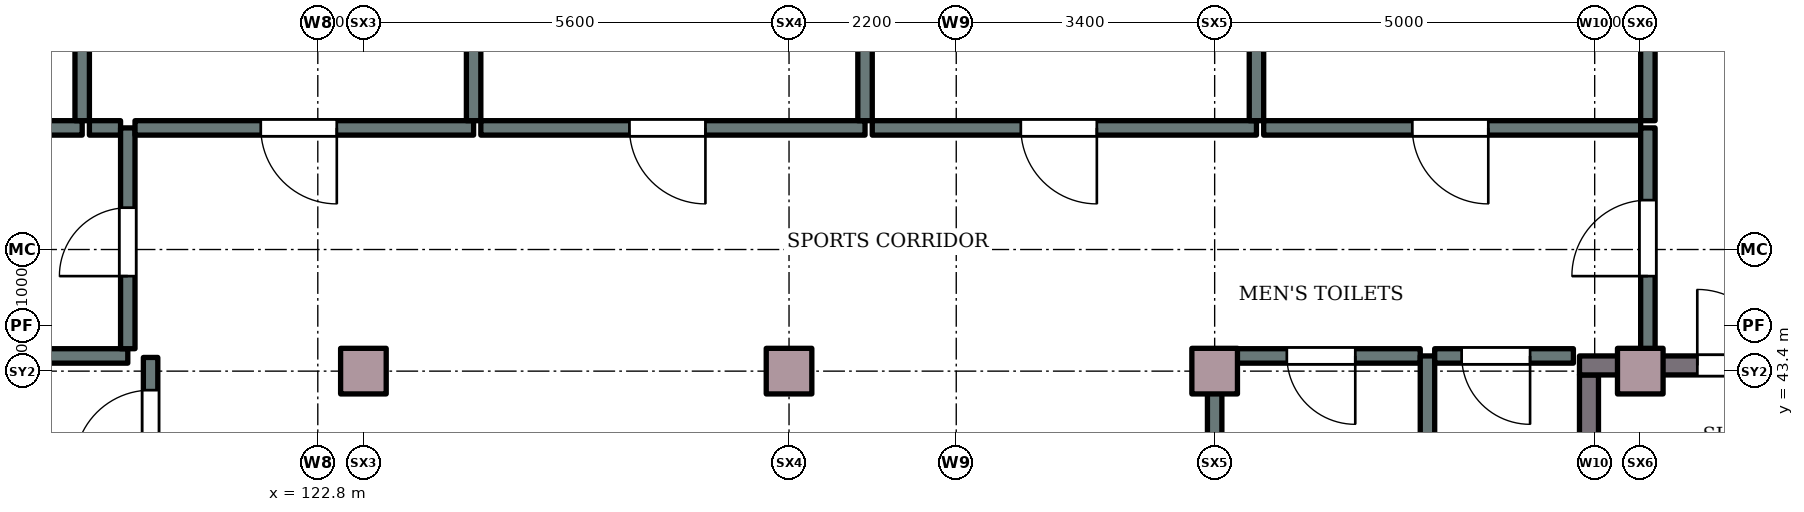
"""IFC4 building model, lengths in metres.
Left out: names, types, materials, properties, quantities, classifications, styles, units other than length and angle.
Written with IfcOpenShell. Run it as: python <this file> out.ifc"""

import sys

from ifc_helpers import new_model, si_unit, direction, frame, frame_2d, origin, origin_2d, place, context, subcontext, project, spatial, rectangle, extrude, element, fill, save


model = new_model("IFC4")
c1 = context("Model", 3, precision=1e-05, world=origin(), true_north=direction((0.0, 1.0)))
c2 = subcontext(c1, "Body", "Model", "MODEL_VIEW")
j1 = project(units=[si_unit("LENGTHUNIT", "METRE"), si_unit("PLANEANGLEUNIT", "RADIAN")], contexts=[c1])
p1 = place(None, origin())
s1 = spatial("IfcSite", under=j1, at=p1, CompositionType="ELEMENT")
p2 = place(p1, origin())
s2 = spatial("IfcBuilding", under=s1, at=p2, CompositionType="ELEMENT")
p3 = place(p2, origin())
s3 = spatial("IfcBuildingStorey", under=s2, at=p3, CompositionType="ELEMENT", Elevation=0.0)
for number, where, z_axis, x_axis in (
    (1, (123.4, 43.4, 0.0), (0.0, 0.0, 1.0), (1.0, 0.0, 0.0)),
    (2, (129.0, 43.4, 0.0), (0.0, 0.0, 1.0), (1.0, 0.0, 0.0)),
    (3, (134.6, 43.4, 0.0), (0.0, 0.0, 1.0), (1.0, 0.0, 0.0)),
    (4, (140.2, 43.4, 0.0), (0.0, 0.0, 1.0), (1.0, 0.0, 0.0)),
):
    element("IfcColumn", number, at=place(p3, frame(where, z_axis=z_axis, x_axis=x_axis)), inside=s3, PredefinedType="COLUMN", context=c2, shape_type="SweptSolid", body=[
        extrude(rectangle(XDim=0.6, YDim=0.6, at=origin_2d()), origin(), (0.0, 0.0, 1.0), 4.2),
    ])
p4 = place(p3, frame((139.525, 38.4, 0.0), z_axis=(0.0, 0.0, 1.0), x_axis=(0.0, 1.0, 0.0)))
e5 = element("IfcWall", 5, at=p4, inside=s3, PredefinedType="SHEAR", context=c2, shape_type="SweptSolid", body=[
    extrude(rectangle(XDim=4.95, YDim=0.25, at=frame_2d((2.475, 0.0))), origin(), (0.0, 0.0, 1.0), 4.2),
])
p5 = place(p3, frame((139.4, 43.475, 0.0), z_axis=(0.0, 0.0, 1.0), x_axis=(1.0, 0.0, 0.0)))
e6 = element("IfcWall", 6, at=p5, inside=s3, PredefinedType="SHEAR", context=c2, shape_type="SweptSolid", body=[
    extrude(rectangle(XDim=6.2, YDim=0.25, at=frame_2d((3.1, 0.0))), origin(), (0.0, 0.0, 1.0), 4.2),
])
p6 = place(p5, frame((1.55, 0.0, 0.0)))
e7 = element("IfcOpeningElement", 7, at=p6, cuts=e6, PredefinedType="OPENING", context=c2, shape_type="SweptSolid", body=[
    extrude(rectangle(XDim=1.0, YDim=2.1, at=frame_2d((0.5, 1.05))), frame((0.0, 0.135, 0.0), z_axis=(0.0, -1.0, 0.0), x_axis=(1.0, 0.0, 0.0)), (0.0, 0.0, 1.0), 0.27),
])
p7 = place(p3, frame((119.7, 46.6, 0.0), z_axis=(0.0, 0.0, 1.0), x_axis=(-1.0, 0.0, 0.0)))
e8 = element("IfcWall", 8, at=p7, inside=s3, PredefinedType="PARTITIONING", context=c2, shape_type="SweptSolid", body=[
    extrude(rectangle(XDim=1.905, YDim=0.19, at=frame_2d((0.953, 0.0))), origin(), (0.0, 0.0, 1.0), 3.9),
])
p8 = place(p7, frame((0.55, 0.0, 0.0)))
e9 = element("IfcOpeningElement", 9, at=p8, cuts=e8, PredefinedType="OPENING", context=c2, shape_type="SweptSolid", body=[
    extrude(rectangle(XDim=0.9, YDim=2.1, at=frame_2d((0.45, 1.05))), frame((0.0, 0.105, 0.0), z_axis=(0.0, -1.0, 0.0), x_axis=(1.0, 0.0, 0.0)), (0.0, 0.0, 1.0), 0.21),
])
p9 = place(p3, frame((119.7, 46.695, 0.0), z_axis=(0.0, 0.0, 1.0), x_axis=(0.0, 1.0, 0.0)))
e10 = element("IfcWall", 10, at=p9, inside=s3, PredefinedType="PARTITIONING", context=c2, shape_type="SweptSolid", body=[
    extrude(rectangle(XDim=6.305, YDim=0.19, at=frame_2d((3.152, 0.0))), origin(), (0.0, 0.0, 1.0), 3.9),
])
p10 = place(p9, frame((2.655, 0.0, 0.0)))
e11 = element("IfcOpeningElement", 11, at=p10, cuts=e10, PredefinedType="OPENING", context=c2, shape_type="SweptSolid", body=[
    extrude(rectangle(XDim=1.0, YDim=2.1, at=frame_2d((0.5, 1.05))), frame((0.0, 0.105, 0.0), z_axis=(0.0, -1.0, 0.0), x_axis=(1.0, 0.0, 0.0)), (0.0, 0.0, 1.0), 0.21),
])
p11 = place(p3, frame((120.205, 46.6, 0.0), z_axis=(0.0, 0.0, 1.0), x_axis=(-1.0, 0.0, 0.0)))
e12 = element("IfcWall", 12, at=p11, inside=s3, PredefinedType="PARTITIONING", context=c2, shape_type="SweptSolid", body=[
    extrude(rectangle(XDim=0.41, YDim=0.19, at=frame_2d((0.205, 0.0))), origin(), (0.0, 0.0, 1.0), 3.9),
])
p12 = place(p3, frame((120.3, 43.6, 0.0), z_axis=(0.0, 0.0, 1.0), x_axis=(-1.0, 0.0, 0.0)))
e13 = element("IfcWall", 13, at=p12, inside=s3, PredefinedType="PARTITIONING", context=c2, shape_type="SweptSolid", body=[
    extrude(rectangle(XDim=1.62, YDim=0.19, at=frame_2d((0.81, 0.0))), origin(), (0.0, 0.0, 1.0), 3.9),
])
p13 = place(p3, frame((120.3, 43.695, 0.0), z_axis=(0.0, 0.0, 1.0), x_axis=(0.0, 1.0, 0.0)))
e14 = element("IfcWall", 14, at=p13, inside=s3, PredefinedType="PARTITIONING", context=c2, shape_type="SweptSolid", body=[
    extrude(rectangle(XDim=2.905, YDim=0.19, at=frame_2d((1.453, 0.0))), origin(), (0.0, 0.0, 1.0), 3.9),
])
p14 = place(p13, frame((0.955, 0.0, 0.0)))
e15 = element("IfcOpeningElement", 15, at=p14, cuts=e14, PredefinedType="OPENING", context=c2, shape_type="SweptSolid", body=[
    extrude(rectangle(XDim=0.9, YDim=2.1, at=frame_2d((0.45, 1.05))), frame((0.0, 0.105, 0.0), z_axis=(0.0, -1.0, 0.0), x_axis=(1.0, 0.0, 0.0)), (0.0, 0.0, 1.0), 0.21),
])
p15 = place(p3, frame((120.6, 41.68, 0.0), z_axis=(0.0, 0.0, 1.0), x_axis=(0.0, 1.0, 0.0)))
e16 = element("IfcWall", 16, at=p15, inside=s3, PredefinedType="PARTITIONING", context=c2, shape_type="SweptSolid", body=[
    extrude(rectangle(XDim=1.9, YDim=0.19, at=frame_2d((0.95, 0.0))), origin(), (0.0, 0.0, 1.0), 3.9),
])
p16 = place(p15, frame((0.47, 0.0, 0.0)))
e17 = element("IfcOpeningElement", 17, at=p16, cuts=e16, PredefinedType="OPENING", context=c2, shape_type="SweptSolid", body=[
    extrude(rectangle(XDim=1.0, YDim=2.1, at=frame_2d((0.5, 1.05))), frame((0.0, 0.105, 0.0), z_axis=(0.0, -1.0, 0.0), x_axis=(1.0, 0.0, 0.0)), (0.0, 0.0, 1.0), 0.21),
])
p17 = place(p3, frame((124.85, 46.6, 0.0), z_axis=(0.0, 0.0, 1.0), x_axis=(-1.0, 0.0, 0.0)))
e18 = element("IfcWall", 18, at=p17, inside=s3, PredefinedType="PARTITIONING", context=c2, shape_type="SweptSolid", body=[
    extrude(rectangle(XDim=4.455, YDim=0.19, at=frame_2d((2.228, 0.0))), origin(), (0.0, 0.0, 1.0), 3.9),
])
p18 = place(p17, frame((1.8, 0.0, 0.0)))
e19 = element("IfcOpeningElement", 19, at=p18, cuts=e18, PredefinedType="OPENING", context=c2, shape_type="SweptSolid", body=[
    extrude(rectangle(XDim=1.0, YDim=2.1, at=frame_2d((0.5, 1.05))), frame((0.0, 0.105, 0.0), z_axis=(0.0, -1.0, 0.0), x_axis=(1.0, 0.0, 0.0)), (0.0, 0.0, 1.0), 0.21),
])
p19 = place(p3, frame((124.85, 46.695, 0.0), z_axis=(0.0, 0.0, 1.0), x_axis=(0.0, 1.0, 0.0)))
e20 = element("IfcWall", 20, at=p19, inside=s3, PredefinedType="PARTITIONING", context=c2, shape_type="SweptSolid", body=[
    extrude(rectangle(XDim=6.305, YDim=0.19, at=frame_2d((3.152, 0.0))), origin(), (0.0, 0.0, 1.0), 3.9),
])
p20 = place(p3, frame((130.0, 46.6, 0.0), z_axis=(0.0, 0.0, 1.0), x_axis=(-1.0, 0.0, 0.0)))
e21 = element("IfcWall", 21, at=p20, inside=s3, PredefinedType="PARTITIONING", context=c2, shape_type="SweptSolid", body=[
    extrude(rectangle(XDim=5.055, YDim=0.19, at=frame_2d((2.527, 0.0))), origin(), (0.0, 0.0, 1.0), 3.9),
])
p21 = place(p20, frame((2.1, 0.0, 0.0)))
e22 = element("IfcOpeningElement", 22, at=p21, cuts=e21, PredefinedType="OPENING", context=c2, shape_type="SweptSolid", body=[
    extrude(rectangle(XDim=1.0, YDim=2.1, at=frame_2d((0.5, 1.05))), frame((0.0, 0.105, 0.0), z_axis=(0.0, -1.0, 0.0), x_axis=(1.0, 0.0, 0.0)), (0.0, 0.0, 1.0), 0.21),
])
p22 = place(p3, frame((130.0, 46.695, 0.0), z_axis=(0.0, 0.0, 1.0), x_axis=(0.0, 1.0, 0.0)))
e23 = element("IfcWall", 23, at=p22, inside=s3, PredefinedType="PARTITIONING", context=c2, shape_type="SweptSolid", body=[
    extrude(rectangle(XDim=6.305, YDim=0.19, at=frame_2d((3.152, 0.0))), origin(), (0.0, 0.0, 1.0), 3.9),
])
p23 = place(p3, frame((134.6, 38.495, 0.0), z_axis=(0.0, 0.0, 1.0), x_axis=(0.0, 1.0, 0.0)))
e24 = element("IfcWall", 24, at=p23, inside=s3, PredefinedType="PARTITIONING", context=c2, shape_type="SweptSolid", body=[
    extrude(rectangle(XDim=5.085, YDim=0.19, at=frame_2d((2.542, 0.0))), origin(), (0.0, 0.0, 1.0), 3.9),
])
p24 = place(p23, frame((2.055, 0.0, 0.0)))
e25 = element("IfcOpeningElement", 25, at=p24, cuts=e24, PredefinedType="OPENING", context=c2, shape_type="SweptSolid", body=[
    extrude(rectangle(XDim=0.9, YDim=2.1, at=frame_2d((0.45, 1.05))), frame((0.0, 0.105, 0.0), z_axis=(0.0, -1.0, 0.0), x_axis=(1.0, 0.0, 0.0)), (0.0, 0.0, 1.0), 0.21),
])
p25 = place(p3, frame((135.15, 46.6, 0.0), z_axis=(0.0, 0.0, 1.0), x_axis=(-1.0, 0.0, 0.0)))
e26 = element("IfcWall", 26, at=p25, inside=s3, PredefinedType="PARTITIONING", context=c2, shape_type="SweptSolid", body=[
    extrude(rectangle(XDim=5.055, YDim=0.19, at=frame_2d((2.527, 0.0))), origin(), (0.0, 0.0, 1.0), 3.9),
])
p26 = place(p25, frame((2.1, 0.0, 0.0)))
e27 = element("IfcOpeningElement", 27, at=p26, cuts=e26, PredefinedType="OPENING", context=c2, shape_type="SweptSolid", body=[
    extrude(rectangle(XDim=1.0, YDim=2.1, at=frame_2d((0.5, 1.05))), frame((0.0, 0.105, 0.0), z_axis=(0.0, -1.0, 0.0), x_axis=(1.0, 0.0, 0.0)), (0.0, 0.0, 1.0), 0.21),
])
p27 = place(p3, frame((135.15, 46.695, 0.0), z_axis=(0.0, 0.0, 1.0), x_axis=(0.0, 1.0, 0.0)))
e28 = element("IfcWall", 28, at=p27, inside=s3, PredefinedType="PARTITIONING", context=c2, shape_type="SweptSolid", body=[
    extrude(rectangle(XDim=6.305, YDim=0.19, at=frame_2d((3.152, 0.0))), origin(), (0.0, 0.0, 1.0), 3.9),
])
p28 = place(p3, frame((137.305, 43.6, 0.0), z_axis=(0.0, 0.0, 1.0), x_axis=(-1.0, 0.0, 0.0)))
e29 = element("IfcWall", 29, at=p28, inside=s3, PredefinedType="PARTITIONING", context=c2, shape_type="SweptSolid", body=[
    extrude(rectangle(XDim=2.685, YDim=0.19, at=frame_2d((1.342, 0.0))), origin(), (0.0, 0.0, 1.0), 3.9),
])
p29 = place(p28, frame((0.855, 0.0, 0.0)))
e30 = element("IfcOpeningElement", 30, at=p29, cuts=e29, PredefinedType="OPENING", context=c2, shape_type="SweptSolid", body=[
    extrude(rectangle(XDim=0.9, YDim=2.1, at=frame_2d((0.45, 1.05))), frame((0.0, 0.105, 0.0), z_axis=(0.0, -1.0, 0.0), x_axis=(1.0, 0.0, 0.0)), (0.0, 0.0, 1.0), 0.21),
])
p30 = place(p3, frame((137.4, 38.48, 0.0), z_axis=(0.0, 0.0, 1.0), x_axis=(0.0, 1.0, 0.0)))
e31 = element("IfcWall", 31, at=p30, inside=s3, PredefinedType="PARTITIONING", context=c2, shape_type="SweptSolid", body=[
    extrude(rectangle(XDim=5.12, YDim=0.19, at=frame_2d((2.56, 0.0))), origin(), (0.0, 0.0, 1.0), 3.9),
])
p31 = place(p3, frame((139.32, 43.6, 0.0), z_axis=(0.0, 0.0, 1.0), x_axis=(-1.0, 0.0, 0.0)))
e32 = element("IfcWall", 32, at=p31, inside=s3, PredefinedType="PARTITIONING", context=c2, shape_type="SweptSolid", body=[
    extrude(rectangle(XDim=1.825, YDim=0.19, at=frame_2d((0.913, 0.0))), origin(), (0.0, 0.0, 1.0), 3.9),
])
p32 = place(p31, frame((0.57, 0.0, 0.0)))
e33 = element("IfcOpeningElement", 33, at=p32, cuts=e32, PredefinedType="OPENING", context=c2, shape_type="SweptSolid", body=[
    extrude(rectangle(XDim=0.9, YDim=2.1, at=frame_2d((0.45, 1.05))), frame((0.0, 0.105, 0.0), z_axis=(0.0, -1.0, 0.0), x_axis=(1.0, 0.0, 0.0)), (0.0, 0.0, 1.0), 0.21),
])
p33 = place(p3, frame((140.205, 46.6, 0.0), z_axis=(0.0, 0.0, 1.0), x_axis=(-1.0, 0.0, 0.0)))
e34 = element("IfcWall", 34, at=p33, inside=s3, PredefinedType="PARTITIONING", context=c2, shape_type="SweptSolid", body=[
    extrude(rectangle(XDim=4.96, YDim=0.19, at=frame_2d((2.48, 0.0))), origin(), (0.0, 0.0, 1.0), 3.9),
])
p34 = place(p33, frame((2.005, 0.0, 0.0)))
e35 = element("IfcOpeningElement", 35, at=p34, cuts=e34, PredefinedType="OPENING", context=c2, shape_type="SweptSolid", body=[
    extrude(rectangle(XDim=1.0, YDim=2.1, at=frame_2d((0.5, 1.05))), frame((0.0, 0.105, 0.0), z_axis=(0.0, -1.0, 0.0), x_axis=(1.0, 0.0, 0.0)), (0.0, 0.0, 1.0), 0.21),
])
p35 = place(p3, frame((140.3, 43.68, 0.0), z_axis=(0.0, 0.0, 1.0), x_axis=(0.0, 1.0, 0.0)))
e36 = element("IfcWall", 36, at=p35, inside=s3, PredefinedType="PARTITIONING", context=c2, shape_type="SweptSolid", body=[
    extrude(rectangle(XDim=2.92, YDim=0.19, at=frame_2d((1.46, 0.0))), origin(), (0.0, 0.0, 1.0), 3.9),
])
p36 = place(p35, frame((0.97, 0.0, 0.0)))
e37 = element("IfcOpeningElement", 37, at=p36, cuts=e36, PredefinedType="OPENING", context=c2, shape_type="SweptSolid", body=[
    extrude(rectangle(XDim=1.0, YDim=2.1, at=frame_2d((0.5, 1.05))), frame((0.0, 0.105, 0.0), z_axis=(0.0, -1.0, 0.0), x_axis=(1.0, 0.0, 0.0)), (0.0, 0.0, 1.0), 0.21),
])
p37 = place(p3, frame((140.3, 46.695, 0.0), z_axis=(0.0, 0.0, 1.0), x_axis=(0.0, 1.0, 0.0)))
e38 = element("IfcWall", 38, at=p37, inside=s3, PredefinedType="PARTITIONING", context=c2, shape_type="SweptSolid", body=[
    extrude(rectangle(XDim=6.305, YDim=0.19, at=frame_2d((3.152, 0.0))), origin(), (0.0, 0.0, 1.0), 3.9),
])
p38 = place(p16, origin())
e39 = element("IfcDoor", 39, at=p38, inside=s3, OperationType="SINGLE_SWING_LEFT", PredefinedType="DOOR", context=c2, shape_type="SweptSolid", body=[
    extrude(rectangle(XDim=1.0, YDim=2.1, at=frame_2d((0.5, 1.05))), frame((0.0, 0.025, 0.0), z_axis=(0.0, -1.0, 0.0), x_axis=(1.0, 0.0, 0.0)), (0.0, 0.0, 1.0), 0.05),
])
fill(e17, e39)
p39 = place(p29, origin())
e40 = element("IfcDoor", 40, at=p39, inside=s3, OperationType="SINGLE_SWING_LEFT", PredefinedType="DOOR", context=c2, shape_type="SweptSolid", body=[
    extrude(rectangle(XDim=0.9, YDim=2.1, at=frame_2d((0.45, 1.05))), frame((0.0, 0.025, 0.0), z_axis=(0.0, -1.0, 0.0), x_axis=(1.0, 0.0, 0.0)), (0.0, 0.0, 1.0), 0.05),
])
fill(e30, e40)
p40 = place(p32, origin())
e41 = element("IfcDoor", 41, at=p40, inside=s3, OperationType="SINGLE_SWING_LEFT", PredefinedType="DOOR", context=c2, shape_type="SweptSolid", body=[
    extrude(rectangle(XDim=0.9, YDim=2.1, at=frame_2d((0.45, 1.05))), frame((0.0, 0.025, 0.0), z_axis=(0.0, -1.0, 0.0), x_axis=(1.0, 0.0, 0.0)), (0.0, 0.0, 1.0), 0.05),
])
fill(e33, e41)
p41 = place(p14, origin())
e42 = element("IfcDoor", 42, at=p41, inside=s3, OperationType="SINGLE_SWING_LEFT", PredefinedType="DOOR", context=c2, shape_type="SweptSolid", body=[
    extrude(rectangle(XDim=0.9, YDim=2.1, at=frame_2d((0.45, 1.05))), frame((0.0, 0.025, 0.0), z_axis=(0.0, -1.0, 0.0), x_axis=(1.0, 0.0, 0.0)), (0.0, 0.0, 1.0), 0.05),
])
fill(e15, e42)
p42 = place(p18, origin())
e43 = element("IfcDoor", 43, at=p42, inside=s3, OperationType="SINGLE_SWING_LEFT", PredefinedType="DOOR", context=c2, shape_type="SweptSolid", body=[
    extrude(rectangle(XDim=1.0, YDim=2.1, at=frame_2d((0.5, 1.05))), frame((0.0, 0.025, 0.0), z_axis=(0.0, -1.0, 0.0), x_axis=(1.0, 0.0, 0.0)), (0.0, 0.0, 1.0), 0.05),
])
fill(e19, e43)
p43 = place(p21, origin())
e44 = element("IfcDoor", 44, at=p43, inside=s3, OperationType="SINGLE_SWING_LEFT", PredefinedType="DOOR", context=c2, shape_type="SweptSolid", body=[
    extrude(rectangle(XDim=1.0, YDim=2.1, at=frame_2d((0.5, 1.05))), frame((0.0, 0.025, 0.0), z_axis=(0.0, -1.0, 0.0), x_axis=(1.0, 0.0, 0.0)), (0.0, 0.0, 1.0), 0.05),
])
fill(e22, e44)
p44 = place(p26, origin())
e45 = element("IfcDoor", 45, at=p44, inside=s3, OperationType="SINGLE_SWING_LEFT", PredefinedType="DOOR", context=c2, shape_type="SweptSolid", body=[
    extrude(rectangle(XDim=1.0, YDim=2.1, at=frame_2d((0.5, 1.05))), frame((0.0, 0.025, 0.0), z_axis=(0.0, -1.0, 0.0), x_axis=(1.0, 0.0, 0.0)), (0.0, 0.0, 1.0), 0.05),
])
fill(e27, e45)
p45 = place(p34, origin())
e46 = element("IfcDoor", 46, at=p45, inside=s3, OperationType="SINGLE_SWING_LEFT", PredefinedType="DOOR", context=c2, shape_type="SweptSolid", body=[
    extrude(rectangle(XDim=1.0, YDim=2.1, at=frame_2d((0.5, 1.05))), frame((0.0, 0.025, 0.0), z_axis=(0.0, -1.0, 0.0), x_axis=(1.0, 0.0, 0.0)), (0.0, 0.0, 1.0), 0.05),
])
fill(e35, e46)
p46 = place(p6, origin())
e47 = element("IfcDoor", 47, at=p46, inside=s3, OperationType="SINGLE_SWING_LEFT", PredefinedType="DOOR", context=c2, shape_type="SweptSolid", body=[
    extrude(rectangle(XDim=1.0, YDim=2.1, at=frame_2d((0.5, 1.05))), frame((0.0, 0.025, 0.0), z_axis=(0.0, -1.0, 0.0), x_axis=(1.0, 0.0, 0.0)), (0.0, 0.0, 1.0), 0.05),
])
fill(e7, e47)
p47 = place(p36, origin())
e48 = element("IfcDoor", 48, at=p47, inside=s3, OperationType="SINGLE_SWING_LEFT", PredefinedType="DOOR", context=c2, shape_type="SweptSolid", body=[
    extrude(rectangle(XDim=1.0, YDim=2.1, at=frame_2d((0.5, 1.05))), frame((0.0, 0.025, 0.0), z_axis=(0.0, -1.0, 0.0), x_axis=(1.0, 0.0, 0.0)), (0.0, 0.0, 1.0), 0.05),
])
fill(e37, e48)
save(model, sys.argv[1])
